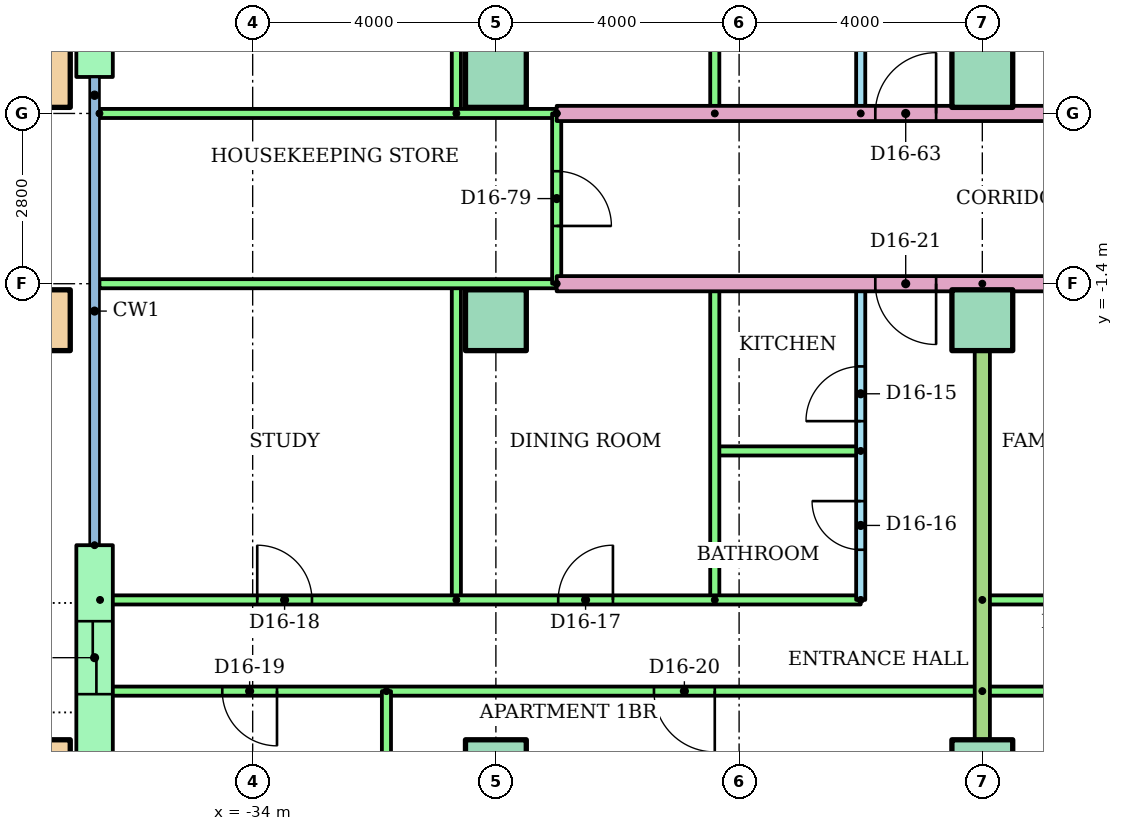
"""IFC4 building model, lengths in metres.
Left out: names, types, materials, properties, quantities, classifications, styles, units other than length and angle.
Written with IfcOpenShell. Run it as: python <this file> out.ifc"""

import sys

from ifc_helpers import new_model, si_unit, direction, frame, frame_2d, origin, origin_2d, place, context, subcontext, project, spatial, rectangle, hollow_rectangle, extrude, element, fill, save


model = new_model("IFC4")
c1 = context("Model", 3, precision=1e-05, world=origin(), true_north=direction((0.0, 1.0)))
c2 = subcontext(c1, "Body", "Model", "MODEL_VIEW")
j1 = project(units=[si_unit("LENGTHUNIT", "METRE"), si_unit("PLANEANGLEUNIT", "RADIAN")], contexts=[c1])
p1 = place(None, origin())
s1 = spatial("IfcSite", under=j1, at=p1, CompositionType="ELEMENT")
p2 = place(p1, origin())
s2 = spatial("IfcBuilding", under=s1, at=p2, CompositionType="ELEMENT")
p3 = place(p2, frame((0.0, 0.0, 60.8)))
s3 = spatial("IfcBuildingStorey", under=s2, at=p3, CompositionType="ELEMENT", Elevation=60.8)
p4 = place(p3, frame((-37.5, -9.4, 0.0)))
e1 = element("IfcColumn", 1, at=p4, inside=s3, PredefinedType="COLUMN", context=c2, shape_type="SweptSolid", body=[
    extrude(hollow_rectangle(XDim=1.0, YDim=1.0, WallThickness=0.05, at=origin_2d()), origin(), (0.0, 0.0, 1.0), 3.2),
])
for number, where in (
    (2, (-30.0, -9.4, 0.0)),
    (3, (-22.0, -9.4, 0.0)),
):
    element("IfcColumn", number, at=place(p3, frame(where)), inside=s3, PredefinedType="COLUMN", context=c2, shape_type="SweptSolid", body=[
        extrude(rectangle(XDim=1.0, YDim=1.0, at=origin_2d()), origin(), (0.0, 0.0, 1.0), 3.2),
    ])
p5 = place(p3, frame((-37.5, -2.0, 0.0)))
e4 = element("IfcColumn", 4, at=p5, inside=s3, PredefinedType="COLUMN", context=c2, shape_type="SweptSolid", body=[
    extrude(hollow_rectangle(XDim=1.0, YDim=1.0, WallThickness=0.05, at=origin_2d()), origin(), (0.0, 0.0, 1.0), 3.2),
])
for number, where in (
    (5, (-30.0, -2.0, 0.0)),
    (6, (-22.0, -2.0, 0.0)),
):
    element("IfcColumn", number, at=place(p3, frame(where)), inside=s3, PredefinedType="COLUMN", context=c2, shape_type="SweptSolid", body=[
        extrude(rectangle(XDim=1.0, YDim=1.0, at=origin_2d()), origin(), (0.0, 0.0, 1.0), 3.2),
    ])
p6 = place(p3, frame((-37.5, 2.0, 0.0)))
e7 = element("IfcColumn", 7, at=p6, inside=s3, PredefinedType="COLUMN", context=c2, shape_type="SweptSolid", body=[
    extrude(hollow_rectangle(XDim=1.0, YDim=1.0, WallThickness=0.05, at=origin_2d()), origin(), (0.0, 0.0, 1.0), 3.2),
])
for number, where in (
    (8, (-30.0, 2.0, 0.0)),
    (9, (-22.0, 2.0, 0.0)),
):
    element("IfcColumn", number, at=place(p3, frame(where)), inside=s3, PredefinedType="COLUMN", context=c2, shape_type="SweptSolid", body=[
        extrude(rectangle(XDim=1.0, YDim=1.0, at=origin_2d()), origin(), (0.0, 0.0, 1.0), 3.2),
    ])
p7 = place(p3, frame((-36.6, 6.5, 0.0), z_axis=(0.0, 0.0, 1.0), x_axis=(0.0, -1.0, 0.0)))
e10 = element("IfcWall", 10, at=p7, inside=s3, PredefinedType="STANDARD", context=c2, shape_type="SweptSolid", body=[
    extrude(rectangle(XDim=4.5, YDim=0.6, at=frame_2d((2.25, 0.0))), origin(), (0.0, 0.0, 1.0), 2.8),
])
p8 = place(p7, frame((1.65, 0.0, 0.0)))
e11 = element("IfcOpeningElement", 11, at=p8, cuts=e10, PredefinedType="OPENING", context=c2, shape_type="SweptSolid", body=[
    extrude(rectangle(XDim=1.2, YDim=2.1, at=frame_2d((0.6, 1.05))), frame((0.0, 0.31, 0.0), z_axis=(0.0, -1.0, 0.0), x_axis=(1.0, 0.0, 0.0)), (0.0, 0.0, 1.0), 0.62),
])
p9 = place(p3, frame((-36.6, -5.7, 0.0), z_axis=(0.0, 0.0, 1.0), x_axis=(0.0, -1.0, 0.0)))
e12 = element("IfcWall", 12, at=p9, inside=s3, PredefinedType="STANDARD", context=c2, shape_type="SweptSolid", body=[
    extrude(rectangle(XDim=3.7, YDim=0.6, at=frame_2d((1.85, 0.0))), origin(), (0.0, 0.0, 1.0), 2.8),
])
p10 = place(p9, frame((1.25, 0.0, 0.0)))
e13 = element("IfcOpeningElement", 13, at=p10, cuts=e12, PredefinedType="OPENING", context=c2, shape_type="SweptSolid", body=[
    extrude(rectangle(XDim=1.2, YDim=2.1, at=frame_2d((0.6, 1.05))), frame((0.0, 0.31, 0.0), z_axis=(0.0, -1.0, 0.0), x_axis=(1.0, 0.0, 0.0)), (0.0, 0.0, 1.0), 0.62),
])
p11 = place(p3, frame((-24.0, -6.6, 0.0), z_axis=(0.0, 0.0, 1.0), x_axis=(0.0, 1.0, 0.0)))
e14 = element("IfcWall", 14, at=p11, inside=s3, PredefinedType="PARTITIONING", context=c2, shape_type="SweptSolid", body=[
    extrude(rectangle(XDim=5.2, YDim=0.15, at=frame_2d((2.6, 0.0))), origin(), (0.0, 0.0, 1.0), 2.4),
])
p12 = place(p11, frame((2.94, 0.0, 0.0)))
e15 = element("IfcOpeningElement", 15, at=p12, cuts=e14, PredefinedType="OPENING", context=c2, shape_type="SweptSolid", body=[
    extrude(rectangle(XDim=0.9, YDim=2.1, at=frame_2d((0.45, 1.05))), frame((0.0, 0.085, 0.0), z_axis=(0.0, -1.0, 0.0), x_axis=(1.0, 0.0, 0.0)), (0.0, 0.0, 1.0), 0.17),
])
p13 = place(p11, frame((0.825, 0.0, 0.0)))
e16 = element("IfcOpeningElement", 16, at=p13, cuts=e14, PredefinedType="OPENING", context=c2, shape_type="SweptSolid", body=[
    extrude(rectangle(XDim=0.8, YDim=2.1, at=frame_2d((0.4, 1.05))), frame((0.0, 0.085, 0.0), z_axis=(0.0, -1.0, 0.0), x_axis=(1.0, 0.0, 0.0)), (0.0, 0.0, 1.0), 0.17),
])
p14 = place(p3, frame((-24.0, -4.15, 0.0), z_axis=(0.0, 0.0, 1.0), x_axis=(-1.0, 0.0, 0.0)))
e17 = element("IfcWall", 17, at=p14, inside=s3, PredefinedType="PARTITIONING", context=c2, shape_type="SweptSolid", body=[
    extrude(rectangle(XDim=2.4, YDim=0.15, at=frame_2d((1.2, 0.0))), origin(), (0.0, 0.0, 1.0), 2.4),
])
for number, where, z_axis, x_axis in (
    (18, (-26.4, -6.6, 0.0), (0.0, 0.0, 1.0), (0.0, 1.0, 0.0)),
    (19, (-30.65, -6.6, 0.0), (0.0, 0.0, 1.0), (0.0, 1.0, 0.0)),
):
    element("IfcWall", number, at=place(p3, frame(where, z_axis=z_axis, x_axis=x_axis)), inside=s3, PredefinedType="PARTITIONING", context=c2, shape_type="SweptSolid", body=[
        extrude(rectangle(XDim=5.2, YDim=0.15, at=frame_2d((2.6, 0.0))), origin(), (0.0, 0.0, 1.0), 2.4),
    ])
p15 = place(p3, frame((-36.51, -6.6, 0.0)))
e20 = element("IfcWall", 20, at=p15, inside=s3, PredefinedType="PARTITIONING", context=c2, shape_type="SweptSolid", body=[
    extrude(rectangle(XDim=12.51, YDim=0.15, at=frame_2d((6.255, 0.0))), origin(), (0.0, 0.0, 1.0), 2.4),
])
p16 = place(p15, frame((7.535, 0.0, 0.0)))
e21 = element("IfcOpeningElement", 21, at=p16, cuts=e20, PredefinedType="OPENING", context=c2, shape_type="SweptSolid", body=[
    extrude(rectangle(XDim=0.9, YDim=2.1, at=frame_2d((0.45, 1.05))), frame((0.0, 0.085, 0.0), z_axis=(0.0, -1.0, 0.0), x_axis=(1.0, 0.0, 0.0)), (0.0, 0.0, 1.0), 0.17),
])
p17 = place(p15, frame((2.585, 0.0, 0.0)))
e22 = element("IfcOpeningElement", 22, at=p17, cuts=e20, PredefinedType="OPENING", context=c2, shape_type="SweptSolid", body=[
    extrude(rectangle(XDim=0.9, YDim=2.1, at=frame_2d((0.45, 1.05))), frame((0.0, 0.085, 0.0), z_axis=(0.0, -1.0, 0.0), x_axis=(1.0, 0.0, 0.0)), (0.0, 0.0, 1.0), 0.17),
])
p18 = place(p3, frame((-22.0, -8.1, 0.0), z_axis=(0.0, 0.0, 1.0), x_axis=(-1.0, 0.0, 0.0)))
e23 = element("IfcWall", 23, at=p18, inside=s3, PredefinedType="PARTITIONING", context=c2, shape_type="SweptSolid", body=[
    extrude(rectangle(XDim=14.51, YDim=0.15, at=frame_2d((7.255, 0.0))), origin(), (0.0, 0.0, 1.0), 2.4),
])
p19 = place(p18, frame((11.6, 0.0, 0.0)))
e24 = element("IfcOpeningElement", 24, at=p19, cuts=e23, PredefinedType="OPENING", context=c2, shape_type="SweptSolid", body=[
    extrude(rectangle(XDim=0.9, YDim=2.1, at=frame_2d((0.45, 1.05))), frame((0.0, 0.085, 0.0), z_axis=(0.0, -1.0, 0.0), x_axis=(1.0, 0.0, 0.0)), (0.0, 0.0, 1.0), 0.17),
])
p20 = place(p18, frame((4.4, 0.0, 0.0)))
e25 = element("IfcOpeningElement", 25, at=p20, cuts=e23, PredefinedType="OPENING", context=c2, shape_type="SweptSolid", body=[
    extrude(rectangle(XDim=1.0, YDim=2.1, at=frame_2d((0.5, 1.05))), frame((0.0, 0.085, 0.0), z_axis=(0.0, -1.0, 0.0), x_axis=(1.0, 0.0, 0.0)), (0.0, 0.0, 1.0), 0.17),
])
p21 = place(p3, frame((-31.8, -8.1, 0.0), z_axis=(0.0, 0.0, 1.0), x_axis=(0.0, -1.0, 0.0)))
e26 = element("IfcWall", 26, at=p21, inside=s3, PredefinedType="PARTITIONING", context=c2, shape_type="SweptSolid", body=[
    extrude(rectangle(XDim=6.22, YDim=0.15, at=frame_2d((3.11, 0.0))), origin(), (0.0, 0.0, 1.0), 2.4),
])
p22 = place(p3, frame((-22.0, -6.6, 0.0)))
e27 = element("IfcWall", 27, at=p22, inside=s3, PredefinedType="PARTITIONING", context=c2, shape_type="SweptSolid", body=[
    extrude(rectangle(XDim=14.0, YDim=0.15, at=frame_2d((7.0, 0.0))), origin(), (0.0, 0.0, 1.0), 2.4),
])
p23 = place(p22, frame((8.775, 0.0, 0.0)))
e28 = element("IfcOpeningElement", 28, at=p23, cuts=e27, PredefinedType="OPENING", context=c2, shape_type="SweptSolid", body=[
    extrude(rectangle(XDim=0.9, YDim=2.1, at=frame_2d((0.45, 1.05))), frame((0.0, 0.085, 0.0), z_axis=(0.0, -1.0, 0.0), x_axis=(1.0, 0.0, 0.0)), (0.0, 0.0, 1.0), 0.17),
])
p24 = place(p22, frame((4.525, 0.0, 0.0)))
e29 = element("IfcOpeningElement", 29, at=p24, cuts=e27, PredefinedType="OPENING", context=c2, shape_type="SweptSolid", body=[
    extrude(rectangle(XDim=0.9, YDim=2.1, at=frame_2d((0.45, 1.05))), frame((0.0, 0.085, 0.0), z_axis=(0.0, -1.0, 0.0), x_axis=(1.0, 0.0, 0.0)), (0.0, 0.0, 1.0), 0.17),
])
p25 = place(p22, frame((1.1, 0.0, 0.0)))
e30 = element("IfcOpeningElement", 30, at=p25, cuts=e27, PredefinedType="OPENING", context=c2, shape_type="SweptSolid", body=[
    extrude(rectangle(XDim=0.9, YDim=2.1, at=frame_2d((0.45, 1.05))), frame((0.0, 0.085, 0.0), z_axis=(0.0, -1.0, 0.0), x_axis=(1.0, 0.0, 0.0)), (0.0, 0.0, 1.0), 0.17),
])
p26 = place(p3, frame((-6.0, -8.1, 0.0), z_axis=(0.0, 0.0, 1.0), x_axis=(-1.0, 0.0, 0.0)))
e31 = element("IfcWall", 31, at=p26, inside=s3, PredefinedType="PARTITIONING", context=c2, shape_type="SweptSolid", body=[
    extrude(rectangle(XDim=16.0, YDim=0.15, at=frame_2d((8.0, 0.0))), origin(), (0.0, 0.0, 1.0), 2.4),
])
p27 = place(p26, frame((13.55, 0.0, 0.0)))
e32 = element("IfcOpeningElement", 32, at=p27, cuts=e31, PredefinedType="OPENING", context=c2, shape_type="SweptSolid", body=[
    extrude(rectangle(XDim=0.9, YDim=2.1, at=frame_2d((0.45, 1.05))), frame((0.0, 0.085, 0.0), z_axis=(0.0, -1.0, 0.0), x_axis=(1.0, 0.0, 0.0)), (0.0, 0.0, 1.0), 0.17),
])
p28 = place(p26, frame((9.5, 0.0, 0.0)))
e33 = element("IfcOpeningElement", 33, at=p28, cuts=e31, PredefinedType="OPENING", context=c2, shape_type="SweptSolid", body=[
    extrude(rectangle(XDim=1.0, YDim=2.1, at=frame_2d((0.5, 1.05))), frame((0.0, 0.085, 0.0), z_axis=(0.0, -1.0, 0.0), x_axis=(1.0, 0.0, 0.0)), (0.0, 0.0, 1.0), 0.17),
])
p29 = place(p26, frame((5.55, 0.0, 0.0)))
e34 = element("IfcOpeningElement", 34, at=p29, cuts=e31, PredefinedType="OPENING", context=c2, shape_type="SweptSolid", body=[
    extrude(rectangle(XDim=0.9, YDim=2.1, at=frame_2d((0.45, 1.05))), frame((0.0, 0.085, 0.0), z_axis=(0.0, -1.0, 0.0), x_axis=(1.0, 0.0, 0.0)), (0.0, 0.0, 1.0), 0.17),
])
p30 = place(p26, frame((1.55, 0.0, 0.0)))
e35 = element("IfcOpeningElement", 35, at=p30, cuts=e31, PredefinedType="OPENING", context=c2, shape_type="SweptSolid", body=[
    extrude(rectangle(XDim=0.9, YDim=2.1, at=frame_2d((0.45, 1.05))), frame((0.0, 0.085, 0.0), z_axis=(0.0, -1.0, 0.0), x_axis=(1.0, 0.0, 0.0)), (0.0, 0.0, 1.0), 0.17),
])
p31 = place(p3, frame((-22.0, -1.4, 0.0), z_axis=(0.0, 0.0, 1.0), x_axis=(0.0, -1.0, 0.0)))
e36 = element("IfcWall", 36, at=p31, inside=s3, PredefinedType="PARTITIONING", context=c2, shape_type="SweptSolid", body=[
    extrude(rectangle(XDim=14.71, YDim=0.25, at=frame_2d((7.355, 0.0))), origin(), (0.0, 0.0, 1.0), 2.4),
])
p32 = place(p3, frame((-14.0, -1.4, 0.0), z_axis=(0.0, 0.0, 1.0), x_axis=(-1.0, 0.0, 0.0)))
e37 = element("IfcWall", 37, at=p32, inside=s3, PredefinedType="PARTITIONING", context=c2, shape_type="SweptSolid", body=[
    extrude(rectangle(XDim=15.0, YDim=0.25, at=frame_2d((7.5, 0.0))), origin(), (0.0, 0.0, 1.0), 2.4),
])
p33 = place(p32, frame((8.76, 0.0, 0.0)))
e38 = element("IfcOpeningElement", 38, at=p33, cuts=e37, PredefinedType="OPENING", context=c2, shape_type="SweptSolid", body=[
    extrude(rectangle(XDim=1.0, YDim=2.1, at=frame_2d((0.5, 1.05))), frame((0.0, 0.135, 0.0), z_axis=(0.0, -1.0, 0.0), x_axis=(1.0, 0.0, 0.0)), (0.0, 0.0, 1.0), 0.27),
])
p34 = place(p3, frame((-29.0, -1.4, 0.0), z_axis=(0.0, 0.0, 1.0), x_axis=(-1.0, 0.0, 0.0)))
e39 = element("IfcWall", 39, at=p34, inside=s3, PredefinedType="PARTITIONING", context=c2, shape_type="SweptSolid", body=[
    extrude(rectangle(XDim=7.52, YDim=0.15, at=frame_2d((3.76, 0.0))), origin(), (0.0, 0.0, 1.0), 2.4),
])
p35 = place(p3, frame((-24.0, 1.4, 0.0), z_axis=(0.0, 0.0, 1.0), x_axis=(0.0, 1.0, 0.0)))
e40 = element("IfcWall", 40, at=p35, inside=s3, PredefinedType="PARTITIONING", context=c2, shape_type="SweptSolid", body=[
    extrude(rectangle(XDim=7.6, YDim=0.15, at=frame_2d((3.8, 0.0))), origin(), (0.0, 0.0, 1.0), 2.4),
])
p36 = place(p35, frame((1.675, 0.0, 0.0)))
e41 = element("IfcOpeningElement", 41, at=p36, cuts=e40, PredefinedType="OPENING", context=c2, shape_type="SweptSolid", body=[
    extrude(rectangle(XDim=0.9, YDim=2.1, at=frame_2d((0.45, 1.05))), frame((0.0, 0.085, 0.0), z_axis=(0.0, -1.0, 0.0), x_axis=(1.0, 0.0, 0.0)), (0.0, 0.0, 1.0), 0.17),
])
p37 = place(p35, frame((5.525, 0.0, 0.0)))
e42 = element("IfcOpeningElement", 42, at=p37, cuts=e40, PredefinedType="OPENING", context=c2, shape_type="SweptSolid", body=[
    extrude(rectangle(XDim=0.8, YDim=2.1, at=frame_2d((0.4, 1.05))), frame((0.0, 0.085, 0.0), z_axis=(0.0, -1.0, 0.0), x_axis=(1.0, 0.0, 0.0)), (0.0, 0.0, 1.0), 0.17),
])
for number, where, z_axis, x_axis in (
    (43, (-26.4, 1.4, 0.0), (0.0, 0.0, 1.0), (0.0, 1.0, 0.0)),
    (44, (-30.65, 1.4, 0.0), (0.0, 0.0, 1.0), (0.0, 1.0, 0.0)),
):
    element("IfcWall", number, at=place(p3, frame(where, z_axis=z_axis, x_axis=x_axis)), inside=s3, PredefinedType="PARTITIONING", context=c2, shape_type="SweptSolid", body=[
        extrude(rectangle(XDim=7.6, YDim=0.15, at=frame_2d((3.8, 0.0))), origin(), (0.0, 0.0, 1.0), 2.4),
    ])
p38 = place(p3, frame((-22.0, 18.521, 0.0), z_axis=(0.0, 0.0, 1.0), x_axis=(0.0, -1.0, 0.0)))
e45 = element("IfcWall", 45, at=p38, inside=s3, PredefinedType="PARTITIONING", context=c2, shape_type="SweptSolid", body=[
    extrude(rectangle(XDim=17.121, YDim=0.25, at=frame_2d((8.561, 0.0))), origin(), (0.0, 0.0, 1.0), 2.4),
])
p39 = place(p3, frame((-29.0, 1.4, 0.0)))
e46 = element("IfcWall", 46, at=p39, inside=s3, PredefinedType="PARTITIONING", context=c2, shape_type="SweptSolid", body=[
    extrude(rectangle(XDim=15.0, YDim=0.25, at=frame_2d((7.5, 0.0))), origin(), (0.0, 0.0, 1.0), 2.4),
])
p40 = place(p39, frame((5.24, 0.0, 0.0)))
e47 = element("IfcOpeningElement", 47, at=p40, cuts=e46, PredefinedType="OPENING", context=c2, shape_type="SweptSolid", body=[
    extrude(rectangle(XDim=1.0, YDim=2.1, at=frame_2d((0.5, 1.05))), frame((0.0, 0.135, 0.0), z_axis=(0.0, -1.0, 0.0), x_axis=(1.0, 0.0, 0.0)), (0.0, 0.0, 1.0), 0.27),
])
p41 = place(p39, frame((13.5, 0.0, 0.0)))
e48 = element("IfcOpeningElement", 48, at=p41, cuts=e46, PredefinedType="OPENING", context=c2, shape_type="SweptSolid", body=[
    extrude(rectangle(XDim=1.0, YDim=2.1, at=frame_2d((0.5, 1.05))), frame((0.0, 0.135, 0.0), z_axis=(0.0, -1.0, 0.0), x_axis=(1.0, 0.0, 0.0)), (0.0, 0.0, 1.0), 0.27),
])
p42 = place(p3, frame((-36.52, 1.4, 0.0)))
e49 = element("IfcWall", 49, at=p42, inside=s3, PredefinedType="PARTITIONING", context=c2, shape_type="SweptSolid", body=[
    extrude(rectangle(XDim=7.52, YDim=0.15, at=frame_2d((3.76, 0.0))), origin(), (0.0, 0.0, 1.0), 2.4),
])
p43 = place(p3, frame((-29.0, 1.4, 0.0), z_axis=(0.0, 0.0, 1.0), x_axis=(0.0, -1.0, 0.0)))
e50 = element("IfcWall", 50, at=p43, inside=s3, PredefinedType="PARTITIONING", context=c2, shape_type="SweptSolid", body=[
    extrude(rectangle(XDim=2.8, YDim=0.15, at=frame_2d((1.4, 0.0))), origin(), (0.0, 0.0, 1.0), 2.4),
])
p44 = place(p43, frame((0.95, 0.0, 0.0)))
e51 = element("IfcOpeningElement", 51, at=p44, cuts=e50, PredefinedType="OPENING", context=c2, shape_type="SweptSolid", body=[
    extrude(rectangle(XDim=0.9, YDim=2.1, at=frame_2d((0.45, 1.05))), frame((0.0, 0.085, 0.0), z_axis=(0.0, -1.0, 0.0), x_axis=(1.0, 0.0, 0.0)), (0.0, 0.0, 1.0), 0.17),
])
p45 = place(p12, origin())
e52 = element("IfcDoor", 52, at=p45, inside=s3, OperationType="SINGLE_SWING_LEFT", PredefinedType="DOOR", context=c2, shape_type="SweptSolid", body=[
    extrude(rectangle(XDim=0.9, YDim=2.1, at=frame_2d((0.45, 1.05))), frame((0.0, 0.025, 0.0), z_axis=(0.0, -1.0, 0.0), x_axis=(1.0, 0.0, 0.0)), (0.0, 0.0, 1.0), 0.05),
])
fill(e15, e52)
p46 = place(p13, origin())
e53 = element("IfcDoor", 53, at=p46, inside=s3, OperationType="SINGLE_SWING_RIGHT", PredefinedType="DOOR", context=c2, shape_type="SweptSolid", body=[
    extrude(rectangle(XDim=0.8, YDim=2.1, at=frame_2d((0.4, 1.05))), frame((0.0, 0.025, 0.0), z_axis=(0.0, -1.0, 0.0), x_axis=(1.0, 0.0, 0.0)), (0.0, 0.0, 1.0), 0.05),
])
fill(e16, e53)
p47 = place(p16, origin())
e54 = element("IfcDoor", 54, at=p47, inside=s3, OperationType="SINGLE_SWING_RIGHT", PredefinedType="DOOR", context=c2, shape_type="SweptSolid", body=[
    extrude(rectangle(XDim=0.9, YDim=2.1, at=frame_2d((0.45, 1.05))), frame((0.0, 0.025, 0.0), z_axis=(0.0, -1.0, 0.0), x_axis=(1.0, 0.0, 0.0)), (0.0, 0.0, 1.0), 0.05),
])
fill(e21, e54)
p48 = place(p17, origin())
e55 = element("IfcDoor", 55, at=p48, inside=s3, OperationType="SINGLE_SWING_LEFT", PredefinedType="DOOR", context=c2, shape_type="SweptSolid", body=[
    extrude(rectangle(XDim=0.9, YDim=2.1, at=frame_2d((0.45, 1.05))), frame((0.0, 0.025, 0.0), z_axis=(0.0, -1.0, 0.0), x_axis=(1.0, 0.0, 0.0)), (0.0, 0.0, 1.0), 0.05),
])
fill(e22, e55)
p49 = place(p19, origin())
e56 = element("IfcDoor", 56, at=p49, inside=s3, OperationType="SINGLE_SWING_LEFT", PredefinedType="DOOR", context=c2, shape_type="SweptSolid", body=[
    extrude(rectangle(XDim=0.9, YDim=2.1, at=frame_2d((0.45, 1.05))), frame((0.0, 0.025, 0.0), z_axis=(0.0, -1.0, 0.0), x_axis=(1.0, 0.0, 0.0)), (0.0, 0.0, 1.0), 0.05),
])
fill(e24, e56)
p50 = place(p20, origin())
e57 = element("IfcDoor", 57, at=p50, inside=s3, OperationType="SINGLE_SWING_LEFT", PredefinedType="DOOR", context=c2, shape_type="SweptSolid", body=[
    extrude(rectangle(XDim=1.0, YDim=2.1, at=frame_2d((0.5, 1.05))), frame((0.0, 0.025, 0.0), z_axis=(0.0, -1.0, 0.0), x_axis=(1.0, 0.0, 0.0)), (0.0, 0.0, 1.0), 0.05),
])
fill(e25, e57)
p51 = place(p33, origin())
e58 = element("IfcDoor", 58, at=p51, inside=s3, OperationType="SINGLE_SWING_LEFT", PredefinedType="DOOR", context=c2, shape_type="SweptSolid", body=[
    extrude(rectangle(XDim=1.0, YDim=2.1, at=frame_2d((0.5, 1.05))), frame((0.0, 0.025, 0.0), z_axis=(0.0, -1.0, 0.0), x_axis=(1.0, 0.0, 0.0)), (0.0, 0.0, 1.0), 0.05),
])
fill(e38, e58)
p52 = place(p40, origin())
e59 = element("IfcDoor", 59, at=p52, inside=s3, OperationType="SINGLE_SWING_RIGHT", PredefinedType="DOOR", context=c2, shape_type="SweptSolid", body=[
    extrude(rectangle(XDim=1.0, YDim=2.1, at=frame_2d((0.5, 1.05))), frame((0.0, 0.025, 0.0), z_axis=(0.0, -1.0, 0.0), x_axis=(1.0, 0.0, 0.0)), (0.0, 0.0, 1.0), 0.05),
])
fill(e47, e59)
p53 = place(p44, origin())
e60 = element("IfcDoor", 60, at=p53, inside=s3, OperationType="SINGLE_SWING_RIGHT", PredefinedType="DOOR", context=c2, shape_type="SweptSolid", body=[
    extrude(rectangle(XDim=0.9, YDim=2.1, at=frame_2d((0.45, 1.05))), frame((0.0, 0.025, 0.0), z_axis=(0.0, -1.0, 0.0), x_axis=(1.0, 0.0, 0.0)), (0.0, 0.0, 1.0), 0.05),
])
fill(e51, e60)
p54 = place(p10, origin())
e61 = element("IfcDoor", 61, at=p54, inside=s3, OperationType="SLIDING_TO_LEFT", PredefinedType="DOOR", context=c2, shape_type="SweptSolid", body=[
    extrude(rectangle(XDim=1.2, YDim=2.1, at=frame_2d((0.6, 1.05))), frame((0.0, 0.025, 0.0), z_axis=(0.0, -1.0, 0.0), x_axis=(1.0, 0.0, 0.0)), (0.0, 0.0, 1.0), 0.05),
])
fill(e13, e61)
save(model, sys.argv[1])
